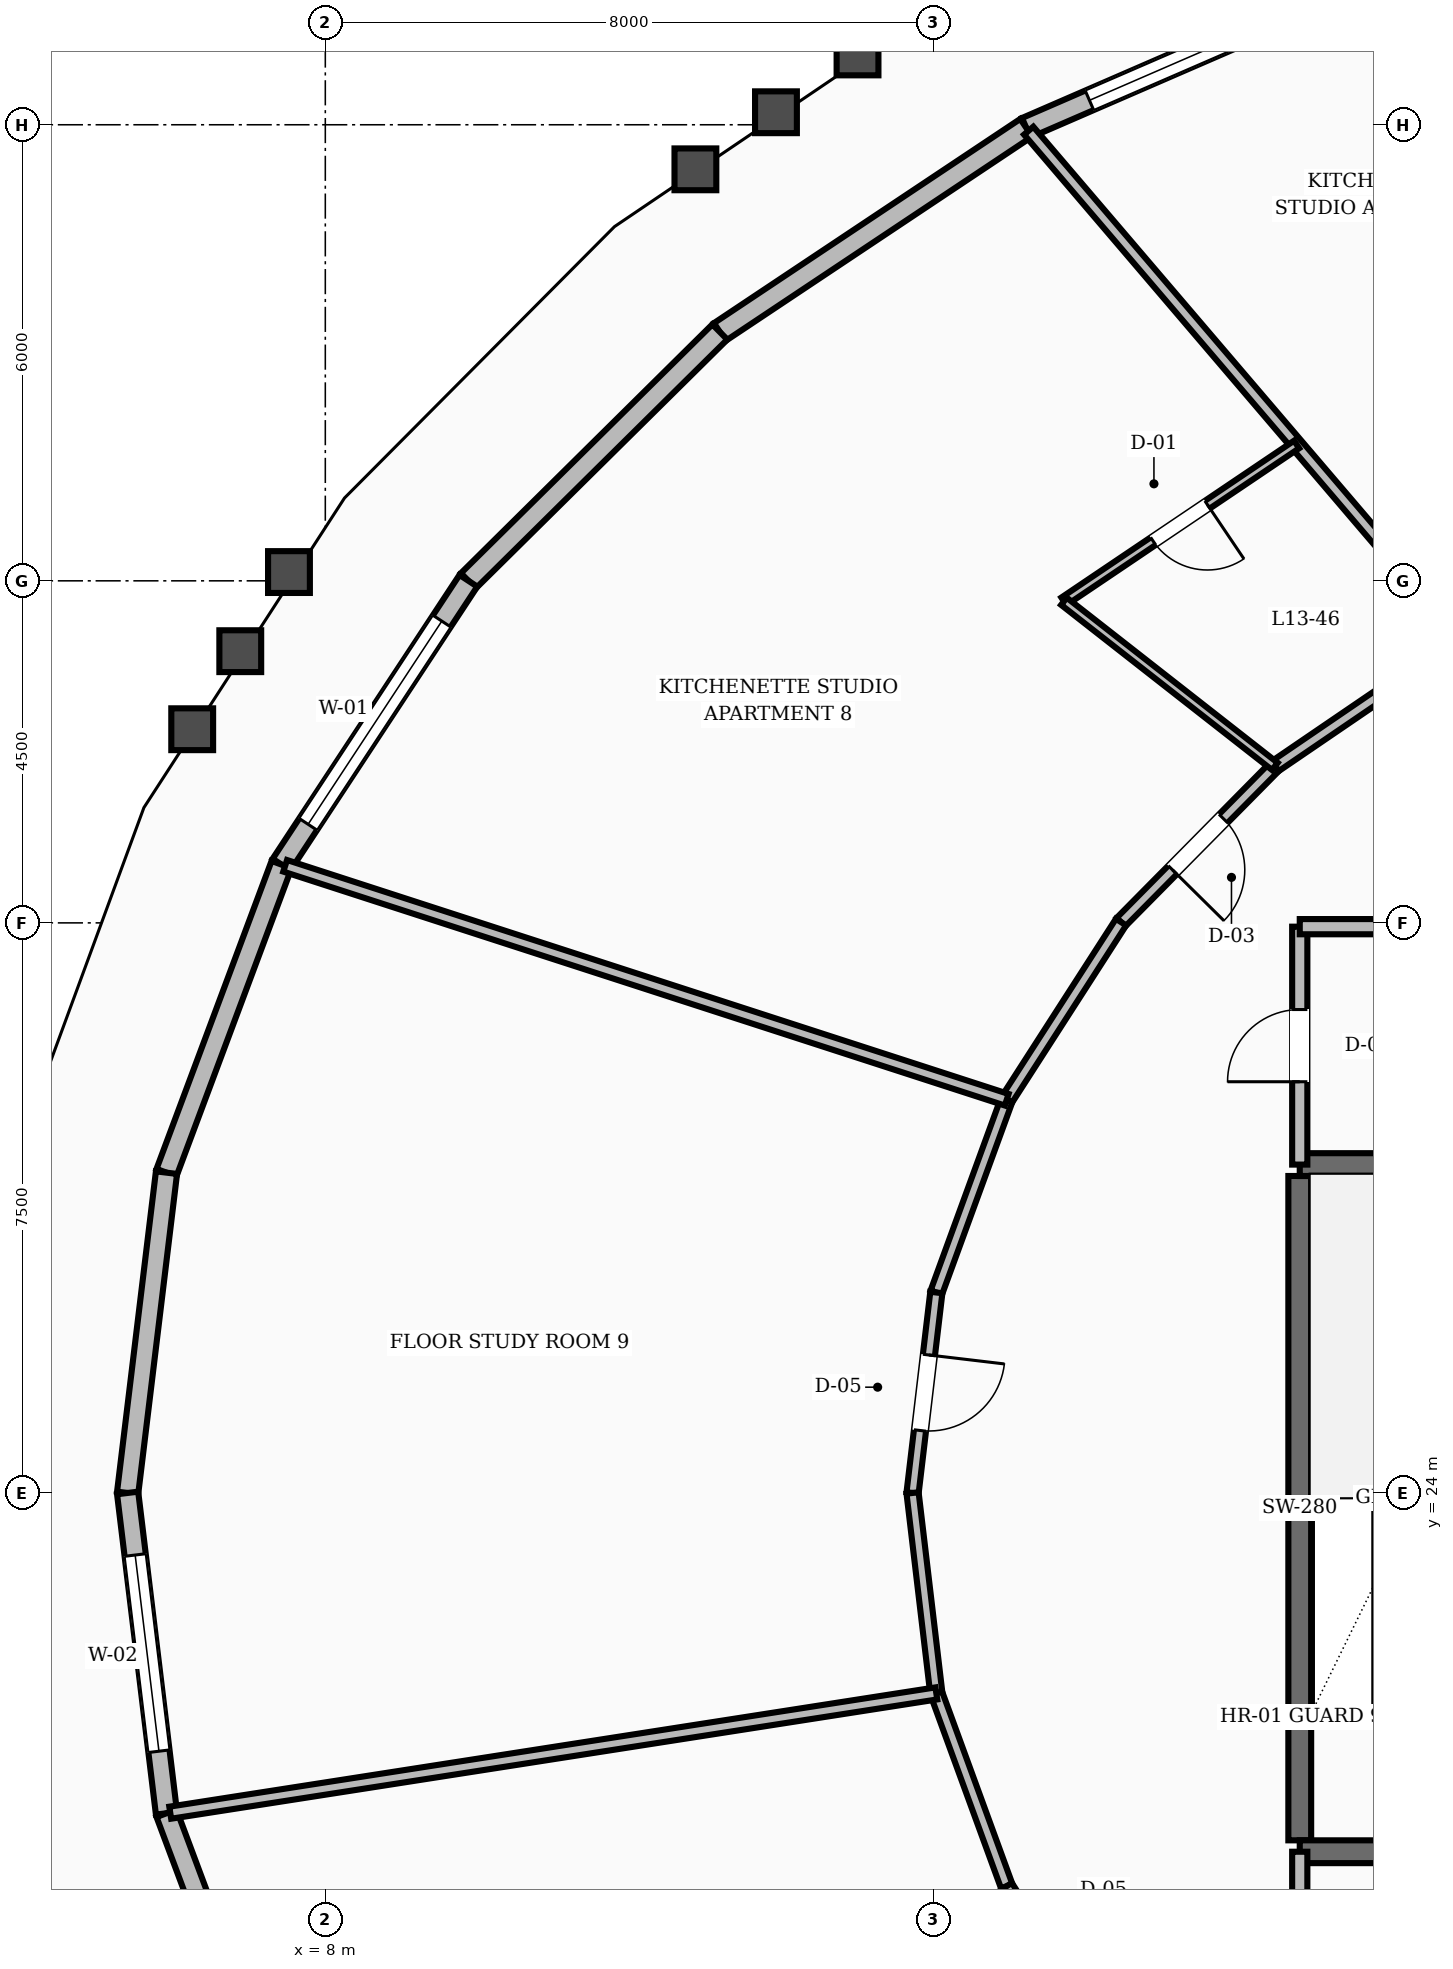
"""IFC4 building model, lengths in metres.
Left out: names, types, materials, properties, quantities, classifications, styles, units other than length and angle.
Written with IfcOpenShell. Run it as: python <this file> out.ifc"""

import sys

from ifc_helpers import new_model, si_unit, direction, frame, frame_2d, origin, place, context, subcontext, project, spatial, rectangle, extrude, element, fill, save


model = new_model("IFC4")
c1 = context("Model", 3, precision=1e-05, world=origin(), true_north=direction((0.0, 1.0)))
c2 = subcontext(c1, "Body", "Model", "MODEL_VIEW")
j1 = project(units=[si_unit("LENGTHUNIT", "METRE"), si_unit("PLANEANGLEUNIT", "RADIAN")], contexts=[c1])
p1 = place(None, origin())
s1 = spatial("IfcSite", under=j1, at=p1, CompositionType="ELEMENT")
p2 = place(p1, origin())
s2 = spatial("IfcBuilding", under=s1, at=p2, CompositionType="ELEMENT")
p3 = place(p2, frame((0.0, 0.0, 55.6)))
s3 = spatial("IfcBuildingStorey", under=s2, at=p3, CompositionType="ELEMENT", Elevation=55.6)
p4 = place(p3, frame((20.82, 19.43, 0.0), z_axis=(0.0, 0.0, 1.0), x_axis=(0.0, 1.0, 0.0)))
e1 = element("IfcWall", 1, at=p4, inside=s3, PredefinedType="SHEAR", context=c2, shape_type="SweptSolid", body=[
    extrude(rectangle(XDim=8.74, YDim=0.3, at=frame_2d((4.37, 0.0))), origin(), (0.0, 0.0, 1.0), 3.6),
])
p5 = place(p3, frame((20.82, 19.28, 0.0), z_axis=(0.0, 0.0, 1.0), x_axis=(1.0, 0.0, 0.0)))
e2 = element("IfcWall", 2, at=p5, inside=s3, PredefinedType="SHEAR", context=c2, shape_type="SweptSolid", body=[
    extrude(rectangle(XDim=3.6, YDim=0.3, at=frame_2d((1.8, 0.0))), origin(), (0.0, 0.0, 1.0), 3.6),
])
p6 = place(p5, frame((1.3, 0.0, 0.0)))
e3 = element("IfcOpeningElement", 3, at=p6, cuts=e2, PredefinedType="OPENING", context=c2, shape_type="SweptSolid", body=[
    extrude(rectangle(XDim=1.1, YDim=2.1, at=frame_2d((0.55, 1.05))), frame((0.0, 0.16, 0.0), z_axis=(0.0, -1.0, 0.0), x_axis=(1.0, 0.0, 0.0)), (0.0, 0.0, 1.0), 0.32),
])
p7 = place(p3, frame((20.82, 28.32, 0.0), z_axis=(0.0, 0.0, 1.0), x_axis=(1.0, 0.0, 0.0)))
e4 = element("IfcWall", 4, at=p7, inside=s3, PredefinedType="SHEAR", context=c2, shape_type="SweptSolid", body=[
    extrude(rectangle(XDim=3.6, YDim=0.3, at=frame_2d((1.8, 0.0))), origin(), (0.0, 0.0, 1.0), 3.6),
])
p8 = place(p3, frame((21.82, 43.956, 0.0), z_axis=(0.0, 0.0, 1.0), x_axis=(-0.917319172231, -0.398152654465, 0.0)))
e5 = element("IfcWall", 5, at=p8, inside=s3, PredefinedType="STANDARD", context=c2, shape_type="SweptSolid", body=[
    extrude(rectangle(XDim=5.013, YDim=0.28, at=frame_2d((2.507, 0.0))), origin(), (0.0, 0.0, 1.0), 2.65),
])
p9 = place(p8, frame((0.907, 0.0, 0.8)))
e6 = element("IfcOpeningElement", 6, at=p9, cuts=e5, PredefinedType="OPENING", context=c2, shape_type="SweptSolid", body=[
    extrude(rectangle(XDim=3.2, YDim=1.65, at=frame_2d((1.6, 0.825))), frame((0.0, 0.15, 0.0), z_axis=(0.0, -1.0, 0.0), x_axis=(1.0, 0.0, 0.0)), (0.0, 0.0, 1.0), 0.3),
])
p10 = place(p3, frame((17.221, 41.96, 0.0), z_axis=(0.0, 0.0, 1.0), x_axis=(-0.832151080198, -0.55454898767, 0.0)))
e7 = element("IfcWall", 7, at=p10, inside=s3, PredefinedType="STANDARD", context=c2, shape_type="SweptSolid", body=[
    extrude(rectangle(XDim=4.844, YDim=0.28, at=frame_2d((2.422, 0.0))), origin(), (0.0, 0.0, 1.0), 2.65),
])
p11 = place(p3, frame((13.19, 39.274, 0.0), z_axis=(0.0, 0.0, 1.0), x_axis=(-0.710847800391, -0.703345864195, 0.0)))
e8 = element("IfcWall", 8, at=p11, inside=s3, PredefinedType="STANDARD", context=c2, shape_type="SweptSolid", body=[
    extrude(rectangle(XDim=4.654, YDim=0.28, at=frame_2d((2.327, 0.0))), origin(), (0.0, 0.0, 1.0), 2.65),
])
p12 = place(p3, frame((9.882, 36.001, 0.0), z_axis=(0.0, 0.0, 1.0), x_axis=(-0.549775955505, -0.835312156471, 0.0)))
e9 = element("IfcWall", 9, at=p12, inside=s3, PredefinedType="STANDARD", context=c2, shape_type="SweptSolid", body=[
    extrude(rectangle(XDim=4.471, YDim=0.28, at=frame_2d((2.235, 0.0))), origin(), (0.0, 0.0, 1.0), 2.65),
])
p13 = place(p12, frame((0.635, 0.0, 0.8)))
e10 = element("IfcOpeningElement", 10, at=p13, cuts=e9, PredefinedType="OPENING", context=c2, shape_type="SweptSolid", body=[
    extrude(rectangle(XDim=3.2, YDim=1.65, at=frame_2d((1.6, 0.825))), frame((0.0, 0.15, 0.0), z_axis=(0.0, -1.0, 0.0), x_axis=(1.0, 0.0, 0.0)), (0.0, 0.0, 1.0), 0.3),
])
p14 = place(p3, frame((7.424, 32.266, 0.0), z_axis=(0.0, 0.0, 1.0), x_axis=(-0.349991270329, -0.936752961401, 0.0)))
e11 = element("IfcWall", 11, at=p14, inside=s3, PredefinedType="STANDARD", context=c2, shape_type="SweptSolid", body=[
    extrude(rectangle(XDim=4.326, YDim=0.28, at=frame_2d((2.163, 0.0))), origin(), (0.0, 0.0, 1.0), 2.65),
])
p15 = place(p3, frame((5.91, 28.214, 0.0), z_axis=(0.0, 0.0, 1.0), x_axis=(-0.120374306833, -0.992728576326, 0.0)))
e12 = element("IfcWall", 12, at=p15, inside=s3, PredefinedType="STANDARD", context=c2, shape_type="SweptSolid", body=[
    extrude(rectangle(XDim=4.245, YDim=0.28, at=frame_2d((2.123, 0.0))), origin(), (0.0, 0.0, 1.0), 2.65),
])
p16 = place(p3, frame((5.399, 24.0, 0.0), z_axis=(0.0, 0.0, 1.0), x_axis=(0.120374306833, -0.992728576326, 0.0)))
e13 = element("IfcWall", 13, at=p16, inside=s3, PredefinedType="STANDARD", context=c2, shape_type="SweptSolid", body=[
    extrude(rectangle(XDim=4.245, YDim=0.28, at=frame_2d((2.123, 0.0))), origin(), (0.0, 0.0, 1.0), 2.65),
])
p17 = place(p16, frame((0.823, 0.0, 0.8)))
e14 = element("IfcOpeningElement", 14, at=p17, cuts=e13, PredefinedType="OPENING", context=c2, shape_type="SweptSolid", body=[
    extrude(rectangle(XDim=2.6, YDim=1.65, at=frame_2d((1.3, 0.825))), frame((0.0, 0.15, 0.0), z_axis=(0.0, -1.0, 0.0), x_axis=(1.0, 0.0, 0.0)), (0.0, 0.0, 1.0), 0.3),
])
p18 = place(p3, frame((5.91, 19.786, 0.0), z_axis=(0.0, 0.0, 1.0), x_axis=(0.349991270329, -0.936752961401, 0.0)))
e15 = element("IfcWall", 15, at=p18, inside=s3, PredefinedType="STANDARD", context=c2, shape_type="SweptSolid", body=[
    extrude(rectangle(XDim=4.326, YDim=0.28, at=frame_2d((2.163, 0.0))), origin(), (0.0, 0.0, 1.0), 2.65),
])
p19 = place(p3, frame((20.82, 16.55, 0.0), z_axis=(0.0, 0.0, 1.0), x_axis=(0.0, 1.0, 0.0)))
e16 = element("IfcWall", 16, at=p19, inside=s3, PredefinedType="SOLIDWALL", context=c2, shape_type="SweptSolid", body=[
    extrude(rectangle(XDim=2.73, YDim=0.2, at=frame_2d((1.365, 0.0))), origin(), (0.0, 0.0, 1.0), 2.61),
])
p20 = place(p19, frame((0.815, 0.0, 0.0)))
e17 = element("IfcOpeningElement", 17, at=p20, cuts=e16, PredefinedType="OPENING", context=c2, shape_type="SweptSolid", body=[
    extrude(rectangle(XDim=1.1, YDim=2.1, at=frame_2d((0.55, 1.05))), frame((0.0, 0.11, 0.0), z_axis=(0.0, -1.0, 0.0), x_axis=(1.0, 0.0, 0.0)), (0.0, 0.0, 1.0), 0.22),
])
p21 = place(p3, frame((20.82, 28.32, 0.0), z_axis=(0.0, 0.0, 1.0), x_axis=(0.0, 1.0, 0.0)))
e18 = element("IfcWall", 18, at=p21, inside=s3, PredefinedType="SOLIDWALL", context=c2, shape_type="SweptSolid", body=[
    extrude(rectangle(XDim=3.13, YDim=0.2, at=frame_2d((1.565, 0.0))), origin(), (0.0, 0.0, 1.0), 2.61),
])
p22 = place(p21, frame((1.09, 0.0, 0.0)))
e19 = element("IfcOpeningElement", 19, at=p22, cuts=e18, PredefinedType="OPENING", context=c2, shape_type="SweptSolid", body=[
    extrude(rectangle(XDim=0.95, YDim=2.1, at=frame_2d((0.475, 1.05))), frame((0.0, 0.11, 0.0), z_axis=(0.0, -1.0, 0.0), x_axis=(1.0, 0.0, 0.0)), (0.0, 0.0, 1.0), 0.22),
])
p23 = place(p3, frame((20.82, 31.45, 0.0), z_axis=(0.0, 0.0, 1.0), x_axis=(1.0, 0.0, 0.0)))
e20 = element("IfcWall", 20, at=p23, inside=s3, PredefinedType="SOLIDWALL", context=c2, shape_type="SweptSolid", body=[
    extrude(rectangle(XDim=3.98, YDim=0.2, at=frame_2d((1.99, 0.0))), origin(), (0.0, 0.0, 1.0), 2.61),
])
p24 = place(p3, frame((22.959, 35.24, 0.0), z_axis=(0.0, 0.0, 1.0), x_axis=(-0.826293096206, -0.56324037423, 0.0)))
e21 = element("IfcWall", 21, at=p24, inside=s3, PredefinedType="SOLIDWALL", context=c2, shape_type="SweptSolid", body=[
    extrude(rectangle(XDim=2.985, YDim=0.16, at=frame_2d((1.492, 0.0))), origin(), (0.0, 0.0, 1.0), 2.61),
])
p25 = place(p3, frame((20.492, 33.559, 0.0), z_axis=(0.0, 0.0, 1.0), x_axis=(-0.702811997, -0.711375636969, 0.0)))
e22 = element("IfcWall", 22, at=p25, inside=s3, PredefinedType="SOLIDWALL", context=c2, shape_type="SweptSolid", body=[
    extrude(rectangle(XDim=2.879, YDim=0.16, at=frame_2d((1.44, 0.0))), origin(), (0.0, 0.0, 1.0), 2.61),
])
p26 = place(p25, frame((0.965, 0.0, 0.0)))
e23 = element("IfcOpeningElement", 23, at=p26, cuts=e22, PredefinedType="OPENING", context=c2, shape_type="SweptSolid", body=[
    extrude(rectangle(XDim=0.95, YDim=2.1, at=frame_2d((0.475, 1.05))), frame((0.0, 0.09, 0.0), z_axis=(0.0, -1.0, 0.0), x_axis=(1.0, 0.0, 0.0)), (0.0, 0.0, 1.0), 0.18),
])
p27 = place(p3, frame((18.469, 31.51, 0.0), z_axis=(0.0, 0.0, 1.0), x_axis=(-0.541126045017, -0.840941498206, 0.0)))
e24 = element("IfcWall", 24, at=p27, inside=s3, PredefinedType="SOLIDWALL", context=c2, shape_type="SweptSolid", body=[
    extrude(rectangle(XDim=2.779, YDim=0.16, at=frame_2d((1.39, 0.0))), origin(), (0.0, 0.0, 1.0), 2.61),
])
p28 = place(p3, frame((16.965, 29.173, 0.0), z_axis=(0.0, 0.0, 1.0), x_axis=(-0.343013437329, -0.939330496583, 0.0)))
e25 = element("IfcWall", 25, at=p28, inside=s3, PredefinedType="SOLIDWALL", context=c2, shape_type="SweptSolid", body=[
    extrude(rectangle(XDim=2.7, YDim=0.16, at=frame_2d((1.35, 0.0))), origin(), (0.0, 0.0, 1.0), 2.61),
])
p29 = place(p3, frame((16.039, 26.637, 0.0), z_axis=(0.0, 0.0, 1.0), x_axis=(-0.117763961213, -0.99304161516, 0.0)))
e26 = element("IfcWall", 26, at=p29, inside=s3, PredefinedType="SOLIDWALL", context=c2, shape_type="SweptSolid", body=[
    extrude(rectangle(XDim=2.656, YDim=0.16, at=frame_2d((1.328, 0.0))), origin(), (0.0, 0.0, 1.0), 2.61),
])
p30 = place(p29, frame((0.828, 0.0, 0.0)))
e27 = element("IfcOpeningElement", 27, at=p30, cuts=e26, PredefinedType="OPENING", context=c2, shape_type="SweptSolid", body=[
    extrude(rectangle(XDim=1.0, YDim=2.1, at=frame_2d((0.5, 1.05))), frame((0.0, 0.09, 0.0), z_axis=(0.0, -1.0, 0.0), x_axis=(1.0, 0.0, 0.0)), (0.0, 0.0, 1.0), 0.18),
])
p31 = place(p3, frame((15.726, 24.0, 0.0), z_axis=(0.0, 0.0, 1.0), x_axis=(0.117763961213, -0.99304161516, 0.0)))
e28 = element("IfcWall", 28, at=p31, inside=s3, PredefinedType="SOLIDWALL", context=c2, shape_type="SweptSolid", body=[
    extrude(rectangle(XDim=2.656, YDim=0.16, at=frame_2d((1.328, 0.0))), origin(), (0.0, 0.0, 1.0), 2.61),
])
p32 = place(p3, frame((16.039, 21.363, 0.0), z_axis=(0.0, 0.0, 1.0), x_axis=(0.343013437329, -0.939330496583, 0.0)))
e29 = element("IfcWall", 29, at=p32, inside=s3, PredefinedType="SOLIDWALL", context=c2, shape_type="SweptSolid", body=[
    extrude(rectangle(XDim=2.7, YDim=0.16, at=frame_2d((1.35, 0.0))), origin(), (0.0, 0.0, 1.0), 2.61),
])
p33 = place(p3, frame((16.965, 18.827, 0.0), z_axis=(0.0, 0.0, 1.0), x_axis=(0.541126045017, -0.840941498206, 0.0)))
e30 = element("IfcWall", 30, at=p33, inside=s3, PredefinedType="SOLIDWALL", context=c2, shape_type="SweptSolid", body=[
    extrude(rectangle(XDim=2.779, YDim=0.16, at=frame_2d((1.39, 0.0))), origin(), (0.0, 0.0, 1.0), 2.61),
])
p34 = place(p33, frame((0.89, 0.0, 0.0)))
e31 = element("IfcOpeningElement", 31, at=p34, cuts=e30, PredefinedType="OPENING", context=c2, shape_type="SweptSolid", body=[
    extrude(rectangle(XDim=1.0, YDim=2.1, at=frame_2d((0.5, 1.05))), frame((0.0, 0.09, 0.0), z_axis=(0.0, -1.0, 0.0), x_axis=(1.0, 0.0, 0.0)), (0.0, 0.0, 1.0), 0.18),
])
p35 = place(p3, frame((22.959, 35.24, 0.0), z_axis=(0.0, 0.0, 1.0), x_axis=(-0.649272964512, 0.760555466454, 0.0)))
e32 = element("IfcWall", 32, at=p35, inside=s3, PredefinedType="SOLIDWALL", context=c2, shape_type="SweptSolid", body=[
    extrude(rectangle(XDim=8.786, YDim=0.16, at=frame_2d((4.393, 0.0))), origin(), (0.0, 0.0, 1.0), 2.61),
])
p36 = place(p3, frame((20.779, 37.794, 0.0), z_axis=(0.0, 0.0, 1.0), x_axis=(-0.829200453513, -0.558951346625, 0.0)))
e33 = element("IfcWall", 33, at=p36, inside=s3, PredefinedType="PARTITIONING", context=c2, shape_type="SweptSolid", body=[
    extrude(rectangle(XDim=3.691, YDim=0.12, at=frame_2d((1.846, 0.0))), origin(), (0.0, 0.0, 1.0), 2.61),
])
p37 = place(p36, frame((1.416, 0.0, 0.0)))
e34 = element("IfcOpeningElement", 34, at=p37, cuts=e33, PredefinedType="OPENING", context=c2, shape_type="SweptSolid", body=[
    extrude(rectangle(XDim=0.86, YDim=2.1, at=frame_2d((0.43, 1.05))), frame((0.0, 0.07, 0.0), z_axis=(0.0, -1.0, 0.0), x_axis=(1.0, 0.0, 0.0)), (0.0, 0.0, 1.0), 0.14),
])
p38 = place(p3, frame((20.492, 33.559, 0.0), z_axis=(0.0, 0.0, 1.0), x_axis=(-0.787449438054, 0.616379252172, 0.0)))
e35 = element("IfcWall", 35, at=p38, inside=s3, PredefinedType="PARTITIONING", context=c2, shape_type="SweptSolid", body=[
    extrude(rectangle(XDim=3.524, YDim=0.12, at=frame_2d((1.762, 0.0))), origin(), (0.0, 0.0, 1.0), 2.61),
])
p39 = place(p3, frame((16.965, 29.173, 0.0), z_axis=(0.0, 0.0, 1.0), x_axis=(-0.951258902123, 0.308393419405, 0.0)))
e36 = element("IfcWall", 36, at=p39, inside=s3, PredefinedType="SOLIDWALL", context=c2, shape_type="SweptSolid", body=[
    extrude(rectangle(XDim=9.979, YDim=0.16, at=frame_2d((4.99, 0.0))), origin(), (0.0, 0.0, 1.0), 2.61),
])
p40 = place(p3, frame((16.039, 21.363, 0.0), z_axis=(0.0, 0.0, 1.0), x_axis=(-0.988098124705, -0.153824887305, 0.0)))
e37 = element("IfcWall", 37, at=p40, inside=s3, PredefinedType="SOLIDWALL", context=c2, shape_type="SweptSolid", body=[
    extrude(rectangle(XDim=10.2, YDim=0.16, at=frame_2d((5.1, 0.0))), origin(), (0.0, 0.0, 1.0), 2.61),
])
p41 = place(p9, origin())
e38 = element("IfcWindow", 38, at=p41, inside=s3, PartitioningType="SINGLE_PANEL", PredefinedType="WINDOW", context=c2, shape_type="SweptSolid", body=[
    extrude(rectangle(XDim=3.2, YDim=1.65, at=frame_2d((1.6, 0.825))), frame((0.0, 0.03, 0.0), z_axis=(0.0, -1.0, 0.0), x_axis=(1.0, 0.0, 0.0)), (0.0, 0.0, 1.0), 0.06),
])
fill(e6, e38)
p42 = place(p13, origin())
e39 = element("IfcWindow", 39, at=p42, inside=s3, PartitioningType="SINGLE_PANEL", PredefinedType="WINDOW", context=c2, shape_type="SweptSolid", body=[
    extrude(rectangle(XDim=3.2, YDim=1.65, at=frame_2d((1.6, 0.825))), frame((0.0, 0.03, 0.0), z_axis=(0.0, -1.0, 0.0), x_axis=(1.0, 0.0, 0.0)), (0.0, 0.0, 1.0), 0.06),
])
fill(e10, e39)
p43 = place(p17, origin())
e40 = element("IfcWindow", 40, at=p43, inside=s3, PartitioningType="SINGLE_PANEL", PredefinedType="WINDOW", context=c2, shape_type="SweptSolid", body=[
    extrude(rectangle(XDim=2.6, YDim=1.65, at=frame_2d((1.3, 0.825))), frame((0.0, 0.03, 0.0), z_axis=(0.0, -1.0, 0.0), x_axis=(1.0, 0.0, 0.0)), (0.0, 0.0, 1.0), 0.06),
])
fill(e14, e40)
p44 = place(p22, origin())
e41 = element("IfcDoor", 41, at=p44, inside=s3, OperationType="SINGLE_SWING_LEFT", PredefinedType="DOOR", context=c2, shape_type="SweptSolid", body=[
    extrude(rectangle(XDim=0.95, YDim=2.1, at=frame_2d((0.475, 1.05))), frame((0.0, 0.025, 0.0), z_axis=(0.0, -1.0, 0.0), x_axis=(1.0, 0.0, 0.0)), (0.0, 0.0, 1.0), 0.05),
])
fill(e19, e41)
p45 = place(p37, origin())
e42 = element("IfcDoor", 42, at=p45, inside=s3, OperationType="SINGLE_SWING_LEFT", PredefinedType="DOOR", context=c2, shape_type="SweptSolid", body=[
    extrude(rectangle(XDim=0.86, YDim=2.1, at=frame_2d((0.43, 1.05))), frame((0.0, 0.025, 0.0), z_axis=(0.0, -1.0, 0.0), x_axis=(1.0, 0.0, 0.0)), (0.0, 0.0, 1.0), 0.05),
])
fill(e34, e42)
p46 = place(p26, origin())
e43 = element("IfcDoor", 43, at=p46, inside=s3, OperationType="SINGLE_SWING_RIGHT", PredefinedType="DOOR", context=c2, shape_type="SweptSolid", body=[
    extrude(rectangle(XDim=0.95, YDim=2.1, at=frame_2d((0.475, 1.05))), frame((0.0, 0.025, 0.0), z_axis=(0.0, -1.0, 0.0), x_axis=(1.0, 0.0, 0.0)), (0.0, 0.0, 1.0), 0.05),
])
fill(e23, e43)
p47 = place(p30, origin())
e44 = element("IfcDoor", 44, at=p47, inside=s3, OperationType="SINGLE_SWING_LEFT", PredefinedType="DOOR", context=c2, shape_type="SweptSolid", body=[
    extrude(rectangle(XDim=1.0, YDim=2.1, at=frame_2d((0.5, 1.05))), frame((0.0, 0.025, 0.0), z_axis=(0.0, -1.0, 0.0), x_axis=(1.0, 0.0, 0.0)), (0.0, 0.0, 1.0), 0.05),
])
fill(e27, e44)
save(model, sys.argv[1])
